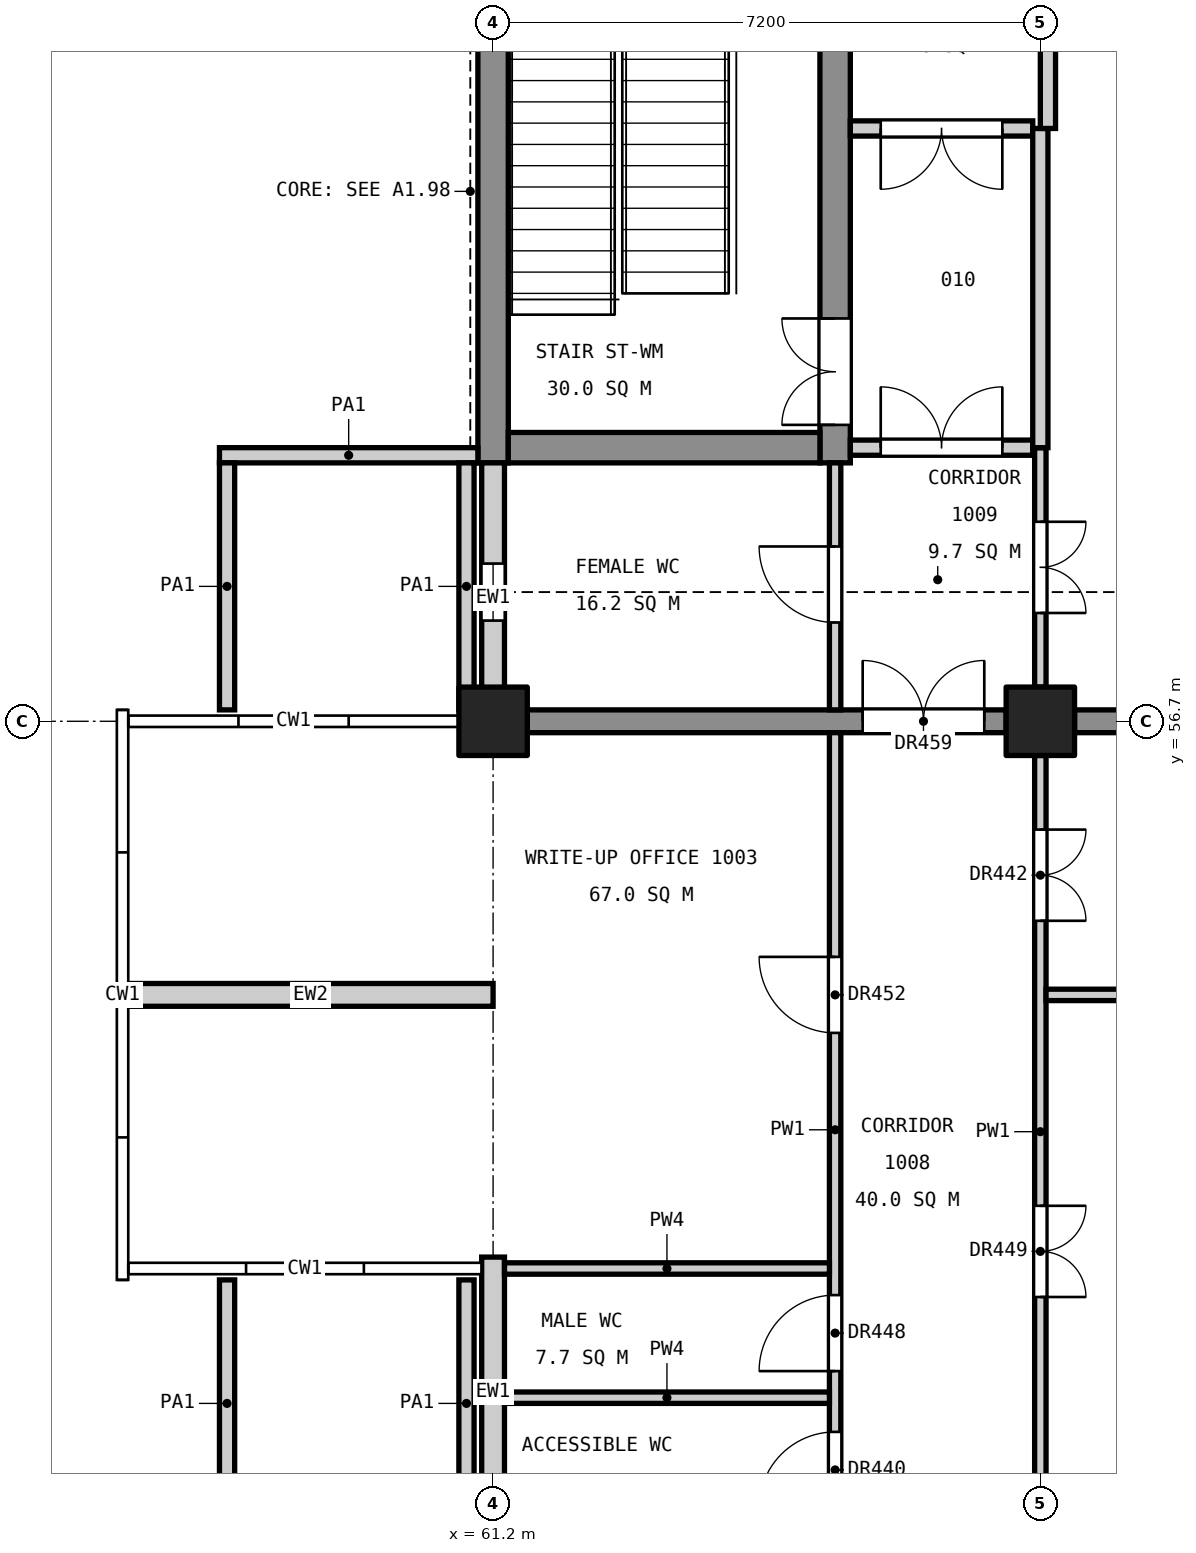
"""IFC4 building model, lengths in metres.
Left out: names, types, materials, properties, quantities, classifications, styles, units other than length and angle.
Written with IfcOpenShell. Run it as: python <this file> out.ifc"""

import sys

from ifc_helpers import new_model, si_unit, direction, frame, frame_2d, origin, origin_2d, place, context, subcontext, project, spatial, rectangle, extrude, element, fill, save


model = new_model("IFC4")
c1 = context("Model", 3, precision=1e-05, world=origin(), true_north=direction((0.0, 1.0)))
c2 = subcontext(c1, "Body", "Model", "MODEL_VIEW")
j1 = project(units=[si_unit("LENGTHUNIT", "METRE"), si_unit("PLANEANGLEUNIT", "RADIAN")], contexts=[c1])
p1 = place(None, origin())
s1 = spatial("IfcSite", under=j1, at=p1, CompositionType="ELEMENT")
p2 = place(p1, origin())
s2 = spatial("IfcBuilding", under=s1, at=p2, CompositionType="ELEMENT")
p3 = place(p2, frame((0.0, 0.0, 51.0)))
s3 = spatial("IfcBuildingStorey", under=s2, at=p3, CompositionType="ELEMENT", Elevation=51.0)
for number, where, z_axis, x_axis in (
    (1, (61.2, 56.7, 0.0), (0.0, 0.0, 1.0), (1.0, 0.0, 0.0)),
    (2, (68.4, 56.7, 0.0), (0.0, 0.0, 1.0), (1.0, 0.0, 0.0)),
):
    element("IfcColumn", number, at=place(p3, frame(where, z_axis=z_axis, x_axis=x_axis)), inside=s3, PredefinedType="COLUMN", context=c2, shape_type="SweptSolid", body=[
        extrude(rectangle(XDim=0.9, YDim=0.9, at=origin_2d()), origin(), (0.0, 0.0, 1.0), 4.8),
    ])
p4 = place(p3, frame((61.2, 60.1, 0.0), z_axis=(0.0, 0.0, 1.0), x_axis=(0.0, 1.0, 0.0)))
e3 = element("IfcWall", 3, at=p4, inside=s3, PredefinedType="SHEAR", context=c2, shape_type="SweptSolid", body=[
    extrude(rectangle(XDim=14.8, YDim=0.4, at=frame_2d((7.4, 0.0))), origin(), (0.0, 0.0, 1.0), 4.55),
])
p5 = place(p4, frame((6.11, 0.0, 3.4)))
e4 = element("IfcOpeningElement", 4, at=p5, cuts=e3, PredefinedType="OPENING", context=c2, shape_type="SweptSolid", body=[
    extrude(rectangle(XDim=1.2, YDim=0.9, at=frame_2d((0.6, 0.45))), frame((0.0, 0.21, 0.0), z_axis=(0.0, -1.0, 0.0), x_axis=(1.0, 0.0, 0.0)), (0.0, 0.0, 1.0), 0.42),
])
p6 = place(p3, frame((65.7, 60.1, 0.0), z_axis=(0.0, 0.0, 1.0), x_axis=(0.0, 1.0, 0.0)))
e5 = element("IfcWall", 5, at=p6, inside=s3, PredefinedType="SHEAR", context=c2, shape_type="SweptSolid", body=[
    extrude(rectangle(XDim=14.8, YDim=0.4, at=frame_2d((7.4, 0.0))), origin(), (0.0, 0.0, 1.0), 4.55),
])
p7 = place(p6, frame((0.5, 0.0, 0.0)))
e6 = element("IfcOpeningElement", 6, at=p7, cuts=e5, PredefinedType="OPENING", context=c2, shape_type="SweptSolid", body=[
    extrude(rectangle(XDim=1.4, YDim=2.1, at=frame_2d((0.7, 1.05))), frame((0.0, 0.21, 0.0), z_axis=(0.0, -1.0, 0.0), x_axis=(1.0, 0.0, 0.0)), (0.0, 0.0, 1.0), 0.42),
])
p8 = place(p6, frame((8.8, 0.0, 0.0)))
e7 = element("IfcOpeningElement", 7, at=p8, cuts=e5, PredefinedType="OPENING", context=c2, shape_type="SweptSolid", body=[
    extrude(rectangle(XDim=1.1, YDim=2.1, at=frame_2d((0.55, 1.05))), frame((0.0, 0.21, 0.0), z_axis=(0.0, -1.0, 0.0), x_axis=(1.0, 0.0, 0.0)), (0.0, 0.0, 1.0), 0.42),
])
p9 = place(p6, frame((11.35, 0.0, 0.0)))
e8 = element("IfcOpeningElement", 8, at=p9, cuts=e5, PredefinedType="OPENING", context=c2, shape_type="SweptSolid", body=[
    extrude(rectangle(XDim=1.1, YDim=2.1, at=frame_2d((0.55, 1.05))), frame((0.0, 0.21, 0.0), z_axis=(0.0, -1.0, 0.0), x_axis=(1.0, 0.0, 0.0)), (0.0, 0.0, 1.0), 0.42),
])
p10 = place(p3, frame((61.4, 60.3, 0.0), z_axis=(0.0, 0.0, 1.0), x_axis=(1.0, 0.0, 0.0)))
e9 = element("IfcWall", 9, at=p10, inside=s3, PredefinedType="SHEAR", context=c2, shape_type="SweptSolid", body=[
    extrude(rectangle(XDim=4.1, YDim=0.4, at=frame_2d((2.05, 0.0))), origin(), (0.0, 0.0, 1.0), 4.55),
])
p11 = place(p3, frame((61.65, 56.7, 0.0), z_axis=(0.0, 0.0, 1.0), x_axis=(1.0, 0.0, 0.0)))
e10 = element("IfcWall", 10, at=p11, inside=s3, PredefinedType="SHEAR", context=c2, shape_type="SweptSolid", body=[
    extrude(rectangle(XDim=6.3, YDim=0.3, at=frame_2d((3.15, 0.0))), origin(), (0.0, 0.0, 1.0), 4.55),
])
p12 = place(p11, frame((4.413, 0.0, 0.0)))
e11 = element("IfcOpeningElement", 11, at=p12, cuts=e10, PredefinedType="OPENING", context=c2, shape_type="SweptSolid", body=[
    extrude(rectangle(XDim=1.6, YDim=2.1, at=frame_2d((0.8, 1.05))), frame((0.0, 0.16, 0.0), z_axis=(0.0, -1.0, 0.0), x_axis=(1.0, 0.0, 0.0)), (0.0, 0.0, 1.0), 0.32),
])
p13 = place(p3, frame((68.85, 56.7, 0.0), z_axis=(0.0, 0.0, 1.0), x_axis=(1.0, 0.0, 0.0)))
e12 = element("IfcWall", 12, at=p13, inside=s3, PredefinedType="SHEAR", context=c2, shape_type="SweptSolid", body=[
    extrude(rectangle(XDim=9.9, YDim=0.3, at=frame_2d((4.95, 0.0))), origin(), (0.0, 0.0, 1.0), 4.55),
])
for number, where, z_axis, x_axis in (
    (13, (60.85, 49.35, 0.0), (0.0, 0.0, 1.0), (0.0, -1.0, 0.0)),
    (14, (57.7, 46.1, 0.0), (0.0, 0.0, 1.0), (0.0, 1.0, 0.0)),
):
    element("IfcWall", number, at=place(p3, frame(where, z_axis=z_axis, x_axis=x_axis)), inside=s3, PredefinedType="PARAPET", context=c2, shape_type="SweptSolid", body=[
        extrude(rectangle(XDim=3.25, YDim=0.2, at=frame_2d((1.625, 0.0))), origin(), (0.0, 0.0, 1.0), 1.2),
    ])
p14 = place(p3, frame((57.6, 60.2, 0.0), z_axis=(0.0, 0.0, 1.0), x_axis=(1.0, 0.0, 0.0)))
e15 = element("IfcWall", 15, at=p14, inside=s3, PredefinedType="PARAPET", context=c2, shape_type="SweptSolid", body=[
    extrude(rectangle(XDim=3.4, YDim=0.2, at=frame_2d((1.7, 0.0))), origin(), (0.0, 0.0, 1.0), 1.2),
])
for number, where, z_axis, x_axis in (
    (16, (60.85, 60.1, 0.0), (0.0, 0.0, 1.0), (0.0, -1.0, 0.0)),
    (17, (57.7, 56.85, 0.0), (0.0, 0.0, 1.0), (0.0, 1.0, 0.0)),
):
    element("IfcWall", number, at=place(p3, frame(where, z_axis=z_axis, x_axis=x_axis)), inside=s3, PredefinedType="PARAPET", context=c2, shape_type="SweptSolid", body=[
        extrude(rectangle(XDim=3.25, YDim=0.2, at=frame_2d((1.625, 0.0))), origin(), (0.0, 0.0, 1.0), 1.2),
    ])
p15 = place(p3, frame((61.2, 46.1, 0.0), z_axis=(0.0, 0.0, 1.0), x_axis=(0.0, 1.0, 0.0)))
e18 = element("IfcWall", 18, at=p15, inside=s3, PredefinedType="STANDARD", context=c2, shape_type="SweptSolid", body=[
    extrude(rectangle(XDim=3.55, YDim=0.3, at=frame_2d((1.775, 0.0))), origin(), (0.0, 0.0, 1.0), 3.65),
])
p16 = place(p3, frame((61.2, 56.55, 0.0), z_axis=(0.0, 0.0, 1.0), x_axis=(0.0, 1.0, 0.0)))
e19 = element("IfcWall", 19, at=p16, inside=s3, PredefinedType="STANDARD", context=c2, shape_type="SweptSolid", body=[
    extrude(rectangle(XDim=3.55, YDim=0.3, at=frame_2d((1.775, 0.0))), origin(), (0.0, 0.0, 1.0), 3.65),
])
p17 = place(p16, frame((1.475, 0.0, 0.8)))
e20 = element("IfcOpeningElement", 20, at=p17, cuts=e19, PredefinedType="OPENING", context=c2, shape_type="SweptSolid", body=[
    extrude(rectangle(XDim=0.75, YDim=1.2, at=frame_2d((0.375, 0.6))), frame((0.0, 0.16, 0.0), z_axis=(0.0, -1.0, 0.0), x_axis=(1.0, 0.0, 0.0)), (0.0, 0.0, 1.0), 0.32),
])
p18 = place(p3, frame((56.4, 53.1, 0.0), z_axis=(0.0, 0.0, 1.0), x_axis=(1.0, 0.0, 0.0)))
e21 = element("IfcWall", 21, at=p18, inside=s3, PredefinedType="STANDARD", context=c2, shape_type="SweptSolid", body=[
    extrude(rectangle(XDim=4.8, YDim=0.3, at=frame_2d((2.4, 0.0))), origin(), (0.0, 0.0, 1.0), 3.65),
])
p19 = place(p3, frame((65.7, 46.1, 0.0), z_axis=(0.0, 0.0, 1.0), x_axis=(0.0, 1.0, 0.0)))
e22 = element("IfcWall", 22, at=p19, inside=s3, PredefinedType="PARTITIONING", context=c2, shape_type="SweptSolid", body=[
    extrude(rectangle(XDim=10.45, YDim=0.15, at=frame_2d((5.225, 0.0))), origin(), (0.0, 0.0, 1.0), 3.55),
])
p20 = place(p19, frame((0.25, 0.0, 0.0)))
e23 = element("IfcOpeningElement", 23, at=p20, cuts=e22, PredefinedType="OPENING", context=c2, shape_type="SweptSolid", body=[
    extrude(rectangle(XDim=1.0, YDim=2.1, at=frame_2d((0.5, 1.05))), frame((0.0, 0.085, 0.0), z_axis=(0.0, -1.0, 0.0), x_axis=(1.0, 0.0, 0.0)), (0.0, 0.0, 1.0), 0.17),
])
p21 = place(p19, frame((2.05, 0.0, 0.0)))
e24 = element("IfcOpeningElement", 24, at=p21, cuts=e22, PredefinedType="OPENING", context=c2, shape_type="SweptSolid", body=[
    extrude(rectangle(XDim=1.0, YDim=2.1, at=frame_2d((0.5, 1.05))), frame((0.0, 0.085, 0.0), z_axis=(0.0, -1.0, 0.0), x_axis=(1.0, 0.0, 0.0)), (0.0, 0.0, 1.0), 0.17),
])
p22 = place(p19, frame((6.5, 0.0, 0.0)))
e25 = element("IfcOpeningElement", 25, at=p22, cuts=e22, PredefinedType="OPENING", context=c2, shape_type="SweptSolid", body=[
    extrude(rectangle(XDim=1.0, YDim=2.1, at=frame_2d((0.5, 1.05))), frame((0.0, 0.085, 0.0), z_axis=(0.0, -1.0, 0.0), x_axis=(1.0, 0.0, 0.0)), (0.0, 0.0, 1.0), 0.17),
])
p23 = place(p3, frame((65.7, 56.85, 0.0), z_axis=(0.0, 0.0, 1.0), x_axis=(0.0, 1.0, 0.0)))
e26 = element("IfcWall", 26, at=p23, inside=s3, PredefinedType="PARTITIONING", context=c2, shape_type="SweptSolid", body=[
    extrude(rectangle(XDim=3.25, YDim=0.15, at=frame_2d((1.625, 0.0))), origin(), (0.0, 0.0, 1.0), 3.55),
])
p24 = place(p23, frame((1.15, 0.0, 0.0)))
e27 = element("IfcOpeningElement", 27, at=p24, cuts=e26, PredefinedType="OPENING", context=c2, shape_type="SweptSolid", body=[
    extrude(rectangle(XDim=1.0, YDim=2.1, at=frame_2d((0.5, 1.05))), frame((0.0, 0.085, 0.0), z_axis=(0.0, -1.0, 0.0), x_axis=(1.0, 0.0, 0.0)), (0.0, 0.0, 1.0), 0.17),
])
p25 = place(p3, frame((61.35, 47.8, 0.0), z_axis=(0.0, 0.0, 1.0), x_axis=(1.0, 0.0, 0.0)))
e28 = element("IfcWall", 28, at=p25, inside=s3, PredefinedType="PARTITIONING", context=c2, shape_type="SweptSolid", body=[
    extrude(rectangle(XDim=4.275, YDim=0.15, at=frame_2d((2.137, 0.0))), origin(), (0.0, 0.0, 1.0), 3.55),
])
p26 = place(p3, frame((61.35, 49.5, 0.0), z_axis=(0.0, 0.0, 1.0), x_axis=(1.0, 0.0, 0.0)))
e29 = element("IfcWall", 29, at=p26, inside=s3, PredefinedType="PARTITIONING", context=c2, shape_type="SweptSolid", body=[
    extrude(rectangle(XDim=4.275, YDim=0.15, at=frame_2d((2.137, 0.0))), origin(), (0.0, 0.0, 1.0), 3.85),
])
p27 = place(p3, frame((65.9, 60.3, 0.0), z_axis=(0.0, 0.0, 1.0), x_axis=(1.0, 0.0, 0.0)))
e30 = element("IfcWall", 30, at=p27, inside=s3, PredefinedType="PARTITIONING", context=c2, shape_type="SweptSolid", body=[
    extrude(rectangle(XDim=2.4, YDim=0.2, at=frame_2d((1.2, 0.0))), origin(), (0.0, 0.0, 1.0), 3.85),
])
p28 = place(p27, frame((0.4, 0.0, 0.0)))
e31 = element("IfcOpeningElement", 31, at=p28, cuts=e30, PredefinedType="OPENING", context=c2, shape_type="SweptSolid", body=[
    extrude(rectangle(XDim=1.6, YDim=2.1, at=frame_2d((0.8, 1.05))), frame((0.0, 0.11, 0.0), z_axis=(0.0, -1.0, 0.0), x_axis=(1.0, 0.0, 0.0)), (0.0, 0.0, 1.0), 0.22),
])
p29 = place(p3, frame((65.9, 64.5, 0.0), z_axis=(0.0, 0.0, 1.0), x_axis=(1.0, 0.0, 0.0)))
e32 = element("IfcWall", 32, at=p29, inside=s3, PredefinedType="PARTITIONING", context=c2, shape_type="SweptSolid", body=[
    extrude(rectangle(XDim=2.4, YDim=0.2, at=frame_2d((1.2, 0.0))), origin(), (0.0, 0.0, 1.0), 3.55),
])
p30 = place(p29, frame((0.4, 0.0, 0.0)))
e33 = element("IfcOpeningElement", 33, at=p30, cuts=e32, PredefinedType="OPENING", context=c2, shape_type="SweptSolid", body=[
    extrude(rectangle(XDim=1.6, YDim=2.1, at=frame_2d((0.8, 1.05))), frame((0.0, 0.11, 0.0), z_axis=(0.0, -1.0, 0.0), x_axis=(1.0, 0.0, 0.0)), (0.0, 0.0, 1.0), 0.22),
])
p31 = place(p3, frame((68.4, 46.35, 0.0), z_axis=(0.0, 0.0, 1.0), x_axis=(0.0, 1.0, 0.0)))
e34 = element("IfcWall", 34, at=p31, inside=s3, PredefinedType="PARTITIONING", context=c2, shape_type="SweptSolid", body=[
    extrude(rectangle(XDim=9.9, YDim=0.15, at=frame_2d((4.95, 0.0))), origin(), (0.0, 0.0, 1.0), 3.55),
])
p32 = place(p31, frame((7.725, 0.0, 0.0)))
e35 = element("IfcOpeningElement", 35, at=p32, cuts=e34, PredefinedType="OPENING", context=c2, shape_type="SweptSolid", body=[
    extrude(rectangle(XDim=1.2, YDim=2.1, at=frame_2d((0.6, 1.05))), frame((0.0, 0.085, 0.0), z_axis=(0.0, -1.0, 0.0), x_axis=(1.0, 0.0, 0.0)), (0.0, 0.0, 1.0), 0.17),
])
p33 = place(p31, frame((2.775, 0.0, 0.0)))
e36 = element("IfcOpeningElement", 36, at=p33, cuts=e34, PredefinedType="OPENING", context=c2, shape_type="SweptSolid", body=[
    extrude(rectangle(XDim=1.2, YDim=2.1, at=frame_2d((0.6, 1.05))), frame((0.0, 0.085, 0.0), z_axis=(0.0, -1.0, 0.0), x_axis=(1.0, 0.0, 0.0)), (0.0, 0.0, 1.0), 0.17),
])
p34 = place(p3, frame((68.4, 57.15, 0.0), z_axis=(0.0, 0.0, 1.0), x_axis=(0.0, 1.0, 0.0)))
e37 = element("IfcWall", 37, at=p34, inside=s3, PredefinedType="PARTITIONING", context=c2, shape_type="SweptSolid", body=[
    extrude(rectangle(XDim=3.15, YDim=0.15, at=frame_2d((1.575, 0.0))), origin(), (0.0, 0.0, 1.0), 3.55),
])
p35 = place(p34, frame((0.975, 0.0, 0.0)))
e38 = element("IfcOpeningElement", 38, at=p35, cuts=e37, PredefinedType="OPENING", context=c2, shape_type="SweptSolid", body=[
    extrude(rectangle(XDim=1.2, YDim=2.1, at=frame_2d((0.6, 1.05))), frame((0.0, 0.085, 0.0), z_axis=(0.0, -1.0, 0.0), x_axis=(1.0, 0.0, 0.0)), (0.0, 0.0, 1.0), 0.17),
])
p36 = place(p3, frame((68.4, 60.3, 0.0), z_axis=(0.0, 0.0, 1.0), x_axis=(0.0, 1.0, 0.0)))
e39 = element("IfcWall", 39, at=p36, inside=s3, PredefinedType="PARTITIONING", context=c2, shape_type="SweptSolid", body=[
    extrude(rectangle(XDim=4.2, YDim=0.2, at=frame_2d((2.1, 0.0))), origin(), (0.0, 0.0, 1.0), 3.55),
])
p37 = place(p3, frame((68.5, 64.5, 0.0), z_axis=(0.0, 0.0, 1.0), x_axis=(0.0, 1.0, 0.0)))
e40 = element("IfcWall", 40, at=p37, inside=s3, PredefinedType="PARTITIONING", context=c2, shape_type="SweptSolid", body=[
    extrude(rectangle(XDim=2.55, YDim=0.2, at=frame_2d((1.275, 0.0))), origin(), (0.0, 0.0, 1.0), 3.55),
])
p38 = place(p3, frame((68.475, 53.1, 0.0), z_axis=(0.0, 0.0, 1.0), x_axis=(1.0, 0.0, 0.0)))
e41 = element("IfcWall", 41, at=p38, inside=s3, PredefinedType="PARTITIONING", context=c2, shape_type="SweptSolid", body=[
    extrude(rectangle(XDim=10.575, YDim=0.15, at=frame_2d((5.288, 0.0))), origin(), (0.0, 0.0, 1.0), 3.85),
])
p39 = place(p7, origin())
e42 = element("IfcDoor", 42, at=p39, inside=s3, OperationType="DOUBLE_DOOR_SINGLE_SWING", PredefinedType="DOOR", context=c2, shape_type="SweptSolid", body=[
    extrude(rectangle(XDim=1.4, YDim=2.1, at=frame_2d((0.7, 1.05))), frame((0.0, 0.025, 0.0), z_axis=(0.0, -1.0, 0.0), x_axis=(1.0, 0.0, 0.0)), (0.0, 0.0, 1.0), 0.05),
])
fill(e6, e42)
p40 = place(p17, origin())
e43 = element("IfcWindow", 43, at=p40, inside=s3, PartitioningType="SINGLE_PANEL", PredefinedType="WINDOW", context=c2, shape_type="SweptSolid", body=[
    extrude(rectangle(XDim=0.75, YDim=1.2, at=frame_2d((0.375, 0.6))), frame((0.0, 0.03, 0.0), z_axis=(0.0, -1.0, 0.0), x_axis=(1.0, 0.0, 0.0)), (0.0, 0.0, 1.0), 0.06),
])
fill(e20, e43)
p41 = place(p20, origin())
e44 = element("IfcDoor", 44, at=p41, inside=s3, OperationType="SINGLE_SWING_LEFT", PredefinedType="DOOR", context=c2, shape_type="SweptSolid", body=[
    extrude(rectangle(XDim=1.0, YDim=2.1, at=frame_2d((0.5, 1.05))), frame((0.0, 0.025, 0.0), z_axis=(0.0, -1.0, 0.0), x_axis=(1.0, 0.0, 0.0)), (0.0, 0.0, 1.0), 0.05),
])
fill(e23, e44)
p42 = place(p32, frame((1.2, 0.0, 0.0), z_axis=(0.0, 0.0, 1.0), x_axis=(-1.0, 0.0, 0.0)))
e45 = element("IfcDoor", 45, at=p42, inside=s3, OperationType="DOUBLE_DOOR_SINGLE_SWING", PredefinedType="DOOR", context=c2, shape_type="SweptSolid", body=[
    extrude(rectangle(XDim=1.2, YDim=2.1, at=frame_2d((0.6, 1.05))), frame((0.0, 0.025, 0.0), z_axis=(0.0, -1.0, 0.0), x_axis=(1.0, 0.0, 0.0)), (0.0, 0.0, 1.0), 0.05),
])
fill(e35, e45)
p43 = place(p24, origin())
e46 = element("IfcDoor", 46, at=p43, inside=s3, OperationType="SINGLE_SWING_RIGHT", PredefinedType="DOOR", context=c2, shape_type="SweptSolid", body=[
    extrude(rectangle(XDim=1.0, YDim=2.1, at=frame_2d((0.5, 1.05))), frame((0.0, 0.025, 0.0), z_axis=(0.0, -1.0, 0.0), x_axis=(1.0, 0.0, 0.0)), (0.0, 0.0, 1.0), 0.05),
])
fill(e27, e46)
p44 = place(p21, origin())
e47 = element("IfcDoor", 47, at=p44, inside=s3, OperationType="SINGLE_SWING_LEFT", PredefinedType="DOOR", context=c2, shape_type="SweptSolid", body=[
    extrude(rectangle(XDim=1.0, YDim=2.1, at=frame_2d((0.5, 1.05))), frame((0.0, 0.025, 0.0), z_axis=(0.0, -1.0, 0.0), x_axis=(1.0, 0.0, 0.0)), (0.0, 0.0, 1.0), 0.05),
])
fill(e24, e47)
p45 = place(p33, frame((1.2, 0.0, 0.0), z_axis=(0.0, 0.0, 1.0), x_axis=(-1.0, 0.0, 0.0)))
e48 = element("IfcDoor", 48, at=p45, inside=s3, OperationType="DOUBLE_DOOR_SINGLE_SWING", PredefinedType="DOOR", context=c2, shape_type="SweptSolid", body=[
    extrude(rectangle(XDim=1.2, YDim=2.1, at=frame_2d((0.6, 1.05))), frame((0.0, 0.025, 0.0), z_axis=(0.0, -1.0, 0.0), x_axis=(1.0, 0.0, 0.0)), (0.0, 0.0, 1.0), 0.05),
])
fill(e36, e48)
p46 = place(p35, frame((1.2, 0.0, 0.0), z_axis=(0.0, 0.0, 1.0), x_axis=(-1.0, 0.0, 0.0)))
e49 = element("IfcDoor", 49, at=p46, inside=s3, OperationType="DOUBLE_DOOR_SINGLE_SWING", PredefinedType="DOOR", context=c2, shape_type="SweptSolid", body=[
    extrude(rectangle(XDim=1.2, YDim=2.1, at=frame_2d((0.6, 1.05))), frame((0.0, 0.025, 0.0), z_axis=(0.0, -1.0, 0.0), x_axis=(1.0, 0.0, 0.0)), (0.0, 0.0, 1.0), 0.05),
])
fill(e38, e49)
p47 = place(p22, origin())
e50 = element("IfcDoor", 50, at=p47, inside=s3, OperationType="SINGLE_SWING_RIGHT", PredefinedType="DOOR", context=c2, shape_type="SweptSolid", body=[
    extrude(rectangle(XDim=1.0, YDim=2.1, at=frame_2d((0.5, 1.05))), frame((0.0, 0.025, 0.0), z_axis=(0.0, -1.0, 0.0), x_axis=(1.0, 0.0, 0.0)), (0.0, 0.0, 1.0), 0.05),
])
fill(e25, e50)
p48 = place(p28, origin())
e51 = element("IfcDoor", 51, at=p48, inside=s3, OperationType="DOUBLE_DOOR_SINGLE_SWING", PredefinedType="DOOR", context=c2, shape_type="SweptSolid", body=[
    extrude(rectangle(XDim=1.6, YDim=2.1, at=frame_2d((0.8, 1.05))), frame((0.0, 0.025, 0.0), z_axis=(0.0, -1.0, 0.0), x_axis=(1.0, 0.0, 0.0)), (0.0, 0.0, 1.0), 0.05),
])
fill(e31, e51)
p49 = place(p30, frame((1.6, 0.0, 0.0), z_axis=(0.0, 0.0, 1.0), x_axis=(-1.0, 0.0, 0.0)))
e52 = element("IfcDoor", 52, at=p49, inside=s3, OperationType="DOUBLE_DOOR_SINGLE_SWING", PredefinedType="DOOR", context=c2, shape_type="SweptSolid", body=[
    extrude(rectangle(XDim=1.6, YDim=2.1, at=frame_2d((0.8, 1.05))), frame((0.0, 0.025, 0.0), z_axis=(0.0, -1.0, 0.0), x_axis=(1.0, 0.0, 0.0)), (0.0, 0.0, 1.0), 0.05),
])
fill(e33, e52)
p50 = place(p12, origin())
e53 = element("IfcDoor", 53, at=p50, inside=s3, OperationType="DOUBLE_DOOR_SINGLE_SWING", PredefinedType="DOOR", context=c2, shape_type="SweptSolid", body=[
    extrude(rectangle(XDim=1.6, YDim=2.1, at=frame_2d((0.8, 1.05))), frame((0.0, 0.025, 0.0), z_axis=(0.0, -1.0, 0.0), x_axis=(1.0, 0.0, 0.0)), (0.0, 0.0, 1.0), 0.05),
])
fill(e11, e53)
save(model, sys.argv[1])
